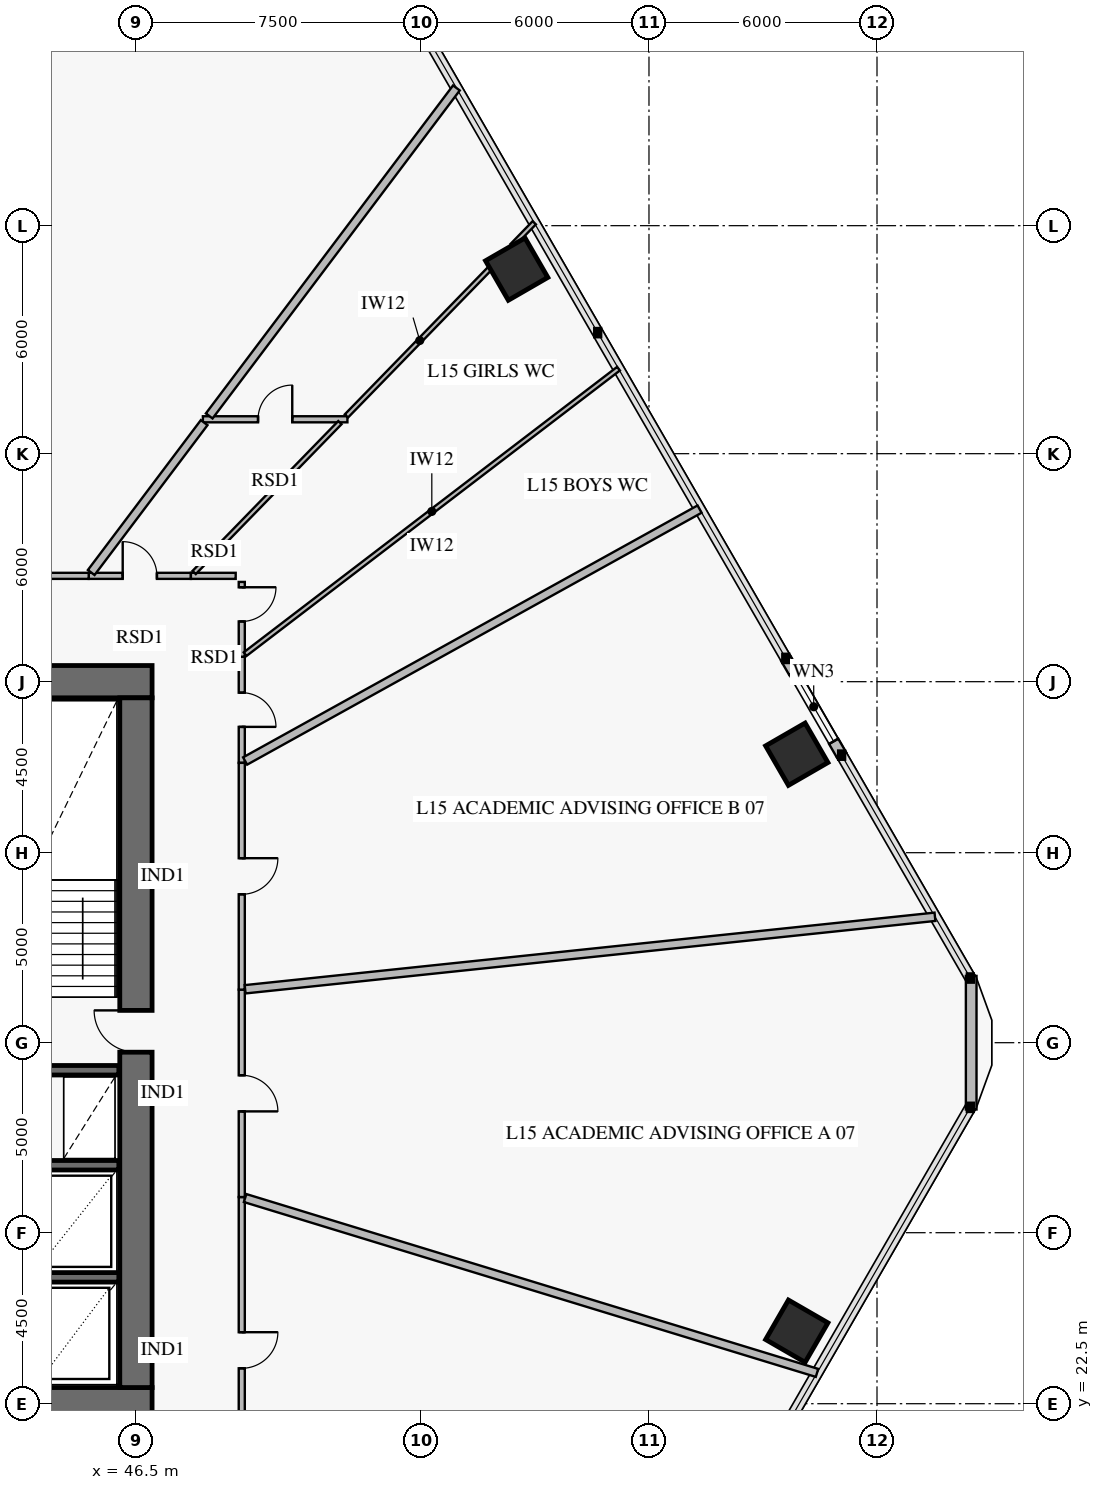
"""IFC4 building model, lengths in metres.
Left out: names, types, materials, properties, quantities, classifications, styles, units other than length and angle.
Written with IfcOpenShell. Run it as: python <this file> out.ifc"""

import sys

from ifc_helpers import new_model, si_unit, direction, frame, frame_2d, origin, origin_2d, place, context, subcontext, project, spatial, rectangle, extrude, element, fill, save


model = new_model("IFC4")
c1 = context("Model", 3, precision=1e-05, world=origin(), true_north=direction((0.0, 1.0)))
c2 = subcontext(c1, "Body", "Model", "MODEL_VIEW")
j1 = project(units=[si_unit("LENGTHUNIT", "METRE"), si_unit("PLANEANGLEUNIT", "RADIAN")], contexts=[c1])
p1 = place(None, origin())
s1 = spatial("IfcSite", under=j1, at=p1, CompositionType="ELEMENT")
p2 = place(p1, origin())
s2 = spatial("IfcBuilding", under=s1, at=p2, CompositionType="ELEMENT")
p3 = place(p2, frame((0.0, 0.0, 62.4)))
s3 = spatial("IfcBuildingStorey", under=s2, at=p3, CompositionType="ELEMENT", Elevation=62.4)
p4 = place(p3, frame((37.35, 22.5, 0.0), z_axis=(0.0, 0.0, 1.0), x_axis=(1.0, 0.0, 0.0)))
e1 = element("IfcWall", 1, at=p4, inside=s3, PredefinedType="SHEAR", context=c2, shape_type="SweptSolid", body=[
    extrude(rectangle(XDim=9.575, YDim=0.85, at=frame_2d((4.788, 0.0))), origin(), (0.0, 0.0, 1.0), 4.2),
])
p5 = place(p4, frame((3.95, 0.0, 0.0)))
e2 = element("IfcOpeningElement", 2, at=p5, cuts=e1, PredefinedType="OPENING", context=c2, shape_type="SweptSolid", body=[
    extrude(rectangle(XDim=1.5, YDim=2.15, at=frame_2d((0.75, 1.075))), frame((0.0, 0.437, 0.0), z_axis=(0.0, -1.0, 0.0), x_axis=(1.0, 0.0, 0.0)), (0.0, 0.0, 1.0), 0.874),
])
p6 = place(p3, frame((46.925, 41.5, 0.0), z_axis=(0.0, 0.0, 1.0), x_axis=(-1.0, 0.0, 0.0)))
e3 = element("IfcWall", 3, at=p6, inside=s3, PredefinedType="SHEAR", context=c2, shape_type="SweptSolid", body=[
    extrude(rectangle(XDim=7.975, YDim=0.85, at=frame_2d((3.988, 0.0))), origin(), (0.0, 0.0, 1.0), 4.2),
])
p7 = place(p3, frame((46.5, 22.925, 0.0), z_axis=(0.0, 0.0, 1.0), x_axis=(0.0, 1.0, 0.0)))
e4 = element("IfcWall", 4, at=p7, inside=s3, PredefinedType="SHEAR", context=c2, shape_type="SweptSolid", body=[
    extrude(rectangle(XDim=18.15, YDim=0.85, at=frame_2d((9.075, 0.0))), origin(), (0.0, 0.0, 1.0), 4.2),
])
p8 = place(p7, frame((8.825, 0.0, 0.0)))
e5 = element("IfcOpeningElement", 5, at=p8, cuts=e4, PredefinedType="OPENING", context=c2, shape_type="SweptSolid", body=[
    extrude(rectangle(XDim=1.1, YDim=2.15, at=frame_2d((0.55, 1.075))), frame((0.0, 0.437, 0.0), z_axis=(0.0, -1.0, 0.0), x_axis=(1.0, 0.0, 0.0)), (0.0, 0.0, 1.0), 0.874),
])
for number, where, z_axis, x_axis in (
    (6, (63.889, 39.592, 0.0), (0.0, 0.0, 1.0), (-0.5, 0.866, 0.0)),
    (7, (56.519, 52.357, 0.0), (0.0, 0.0, 1.0), (-0.5, 0.866, 0.0)),
    (8, (63.889, 24.408, 0.0), (0.0, 0.0, 1.0), (0.5, 0.866, 0.0)),
):
    element("IfcColumn", number, at=place(p3, frame(where, z_axis=z_axis, x_axis=x_axis)), inside=s3, PredefinedType="COLUMN", context=c2, shape_type="SweptSolid", body=[
        extrude(rectangle(XDim=1.2, YDim=1.2, at=origin_2d()), origin(), (0.0, 0.0, 1.0), 3.92),
    ])
p9 = place(p3, frame((63.6, 42.113, 0.0), z_axis=(0.0, 0.0, 1.0), x_axis=(0.499988418424, -0.866032090307, 0.0)))
e9 = element("IfcWall", 9, at=p9, inside=s3, PredefinedType="SOLIDWALL", context=c2, shape_type="SweptSolid", body=[
    extrude(rectangle(XDim=2.94, YDim=0.28, at=frame_2d((1.47, 0.0))), origin(), (0.0, 0.0, 1.0), 3.492),
])
p10 = place(p9, frame((0.42, 0.0, 0.7)))
e10 = element("IfcOpeningElement", 10, at=p10, cuts=e9, PredefinedType="OPENING", context=c2, shape_type="SweptSolid", body=[
    extrude(rectangle(XDim=2.1, YDim=1.5, at=frame_2d((1.05, 0.75))), frame((0.0, 0.152, 0.0), z_axis=(0.0, -1.0, 0.0), x_axis=(1.0, 0.0, 0.0)), (0.0, 0.0, 1.0), 0.304),
])
p11 = place(p3, frame((68.479, 33.758, 0.0), z_axis=(0.0, 0.0, 1.0), x_axis=(0.0, -1.0, 0.0)))
e11 = element("IfcWall", 11, at=p11, inside=s3, PredefinedType="SOLIDWALL", context=c2, shape_type="SweptSolid", body=[
    extrude(rectangle(XDim=3.515, YDim=0.28, at=frame_2d((1.758, 0.0))), origin(), (0.0, 0.0, 1.0), 3.92),
])
p12 = place(p3, frame((25.95, 31.275, 0.0), z_axis=(0.0, 0.0, 1.0), x_axis=(1.0, 0.0, 0.0)))
e12 = element("IfcWall", 12, at=p12, inside=s3, PredefinedType="SOLIDWALL", context=c2, shape_type="SweptSolid", body=[
    extrude(rectangle(XDim=20.1, YDim=0.25, at=frame_2d((10.05, 0.0))), origin(), (0.0, 0.0, 1.0), 4.2),
])
p13 = place(p12, frame((2.6, 0.0, 0.0)))
e13 = element("IfcOpeningElement", 13, at=p13, cuts=e12, PredefinedType="OPENING", context=c2, shape_type="SweptSolid", body=[
    extrude(rectangle(XDim=1.1, YDim=2.15, at=frame_2d((0.55, 1.075))), frame((0.0, 0.137, 0.0), z_axis=(0.0, -1.0, 0.0), x_axis=(1.0, 0.0, 0.0)), (0.0, 0.0, 1.0), 0.274),
])
p14 = place(p12, frame((10.6, 0.0, 0.0)))
e14 = element("IfcOpeningElement", 14, at=p14, cuts=e12, PredefinedType="OPENING", context=c2, shape_type="SweptSolid", body=[
    extrude(rectangle(XDim=1.1, YDim=2.15, at=frame_2d((0.55, 1.075))), frame((0.0, 0.137, 0.0), z_axis=(0.0, -1.0, 0.0), x_axis=(1.0, 0.0, 0.0)), (0.0, 0.0, 1.0), 0.274),
])
p15 = place(p12, frame((16.35, 0.0, 0.0)))
e15 = element("IfcOpeningElement", 15, at=p15, cuts=e12, PredefinedType="OPENING", context=c2, shape_type="SweptSolid", body=[
    extrude(rectangle(XDim=1.1, YDim=2.15, at=frame_2d((0.55, 1.075))), frame((0.0, 0.137, 0.0), z_axis=(0.0, -1.0, 0.0), x_axis=(1.0, 0.0, 0.0)), (0.0, 0.0, 1.0), 0.274),
])
for number, where, z_axis, x_axis in (
    (16, (43.8, 25.825, 0.0), (0.0, 0.0, 1.0), (1.0, 0.0, 0.0)),
    (17, (43.8, 28.775, 0.0), (0.0, 0.0, 1.0), (1.0, 0.0, 0.0)),
):
    element("IfcWall", number, at=place(p3, frame(where, z_axis=z_axis, x_axis=x_axis)), inside=s3, PredefinedType="SOLIDWALL", context=c2, shape_type="SweptSolid", body=[
        extrude(rectangle(XDim=2.25, YDim=0.25, at=frame_2d((1.125, 0.0))), origin(), (0.0, 0.0, 1.0), 4.2),
    ])
p16 = place(p3, frame((49.285, 39.364, 0.0), z_axis=(0.0, 0.0, 1.0), x_axis=(0.0, 1.0, 0.0)))
e18 = element("IfcWall", 18, at=p16, inside=s3, PredefinedType="PARTITIONING", context=c2, shape_type="SweptSolid", body=[
    extrude(rectangle(XDim=2.793, YDim=0.16, at=frame_2d((1.396, 0.0))), origin(), (0.0, 0.0, 1.0), 3.92),
])
p17 = place(p16, frame((0.947, 0.0, 0.0)))
e19 = element("IfcOpeningElement", 19, at=p17, cuts=e18, PredefinedType="OPENING", context=c2, shape_type="SweptSolid", body=[
    extrude(rectangle(XDim=0.9, YDim=2.1, at=frame_2d((0.45, 1.05))), frame((0.0, 0.092, 0.0), z_axis=(0.0, -1.0, 0.0), x_axis=(1.0, 0.0, 0.0)), (0.0, 0.0, 1.0), 0.184),
])
p18 = place(p3, frame((49.285, 42.157, 0.0), z_axis=(0.0, 0.0, 1.0), x_axis=(0.0, 1.0, 0.0)))
e20 = element("IfcWall", 20, at=p18, inside=s3, PredefinedType="PARTITIONING", context=c2, shape_type="SweptSolid", body=[
    extrude(rectangle(XDim=1.968, YDim=0.16, at=frame_2d((0.984, 0.0))), origin(), (0.0, 0.0, 1.0), 3.92),
])
p19 = place(p18, frame((0.928, 0.0, 0.0)))
e21 = element("IfcOpeningElement", 21, at=p19, cuts=e20, PredefinedType="OPENING", context=c2, shape_type="SweptSolid", body=[
    extrude(rectangle(XDim=0.9, YDim=2.1, at=frame_2d((0.45, 1.05))), frame((0.0, 0.092, 0.0), z_axis=(0.0, -1.0, 0.0), x_axis=(1.0, 0.0, 0.0)), (0.0, 0.0, 1.0), 0.184),
])
p20 = place(p3, frame((48.262, 48.405, 0.0), z_axis=(0.0, 0.0, 1.0), x_axis=(1.0, 0.0, 0.0)))
e22 = element("IfcWall", 22, at=p20, inside=s3, PredefinedType="PARTITIONING", context=c2, shape_type="SweptSolid", body=[
    extrude(rectangle(XDim=3.803, YDim=0.16, at=frame_2d((1.901, 0.0))), origin(), (0.0, 0.0, 1.0), 3.47),
])
p21 = place(p20, frame((1.451, 0.0, 0.0)))
e23 = element("IfcOpeningElement", 23, at=p21, cuts=e22, PredefinedType="OPENING", context=c2, shape_type="SweptSolid", body=[
    extrude(rectangle(XDim=0.9, YDim=2.1, at=frame_2d((0.45, 1.05))), frame((0.0, 0.092, 0.0), z_axis=(0.0, -1.0, 0.0), x_axis=(1.0, 0.0, 0.0)), (0.0, 0.0, 1.0), 0.184),
])
p22 = place(p3, frame((47.947, 44.285, 0.0), z_axis=(0.0, 0.0, 1.0), x_axis=(-1.0, 0.0, 0.0)))
e24 = element("IfcWall", 24, at=p22, inside=s3, PredefinedType="PARTITIONING", context=c2, shape_type="SweptSolid", body=[
    extrude(rectangle(XDim=2.689, YDim=0.16, at=frame_2d((1.345, 0.0))), origin(), (0.0, 0.0, 1.0), 3.92),
])
p23 = place(p22, frame((0.895, 0.0, 0.0)))
e25 = element("IfcOpeningElement", 25, at=p23, cuts=e24, PredefinedType="OPENING", context=c2, shape_type="SweptSolid", body=[
    extrude(rectangle(XDim=0.9, YDim=2.1, at=frame_2d((0.45, 1.05))), frame((0.0, 0.092, 0.0), z_axis=(0.0, -1.0, 0.0), x_axis=(1.0, 0.0, 0.0)), (0.0, 0.0, 1.0), 0.184),
])
p24 = place(p3, frame((45.257, 44.285, 0.0), z_axis=(0.0, 0.0, 1.0), x_axis=(-1.0, 0.0, 0.0)))
e26 = element("IfcWall", 26, at=p24, inside=s3, PredefinedType="PARTITIONING", context=c2, shape_type="SweptSolid", body=[
    extrude(rectangle(XDim=11.869, YDim=0.16, at=frame_2d((5.934, 0.0))), origin(), (0.0, 0.0, 1.0), 3.22),
])
p25 = place(p24, frame((5.184, 0.0, 0.0)))
e27 = element("IfcOpeningElement", 27, at=p25, cuts=e26, PredefinedType="OPENING", context=c2, shape_type="SweptSolid", body=[
    extrude(rectangle(XDim=1.5, YDim=2.15, at=frame_2d((0.75, 1.075))), frame((0.0, 0.092, 0.0), z_axis=(0.0, -1.0, 0.0), x_axis=(1.0, 0.0, 0.0)), (0.0, 0.0, 1.0), 0.184),
])
p26 = place(p3, frame((49.285, 19.875, 0.0), z_axis=(0.0, 0.0, 1.0), x_axis=(0.0, 1.0, 0.0)))
e28 = element("IfcWall", 28, at=p26, inside=s3, PredefinedType="PARTITIONING", context=c2, shape_type="SweptSolid", body=[
    extrude(rectangle(XDim=8.063, YDim=0.16, at=frame_2d((4.032, 0.0))), origin(), (0.0, 0.0, 1.0), 3.92),
])
p27 = place(p26, frame((3.557, 0.0, 0.0)))
e29 = element("IfcOpeningElement", 29, at=p27, cuts=e28, PredefinedType="OPENING", context=c2, shape_type="SweptSolid", body=[
    extrude(rectangle(XDim=0.95, YDim=2.1, at=frame_2d((0.475, 1.05))), frame((0.0, 0.092, 0.0), z_axis=(0.0, -1.0, 0.0), x_axis=(1.0, 0.0, 0.0)), (0.0, 0.0, 1.0), 0.184),
])
p28 = place(p3, frame((49.285, 27.938, 0.0), z_axis=(0.0, 0.0, 1.0), x_axis=(0.0, 1.0, 0.0)))
e30 = element("IfcWall", 30, at=p28, inside=s3, PredefinedType="PARTITIONING", context=c2, shape_type="SweptSolid", body=[
    extrude(rectangle(XDim=5.458, YDim=0.16, at=frame_2d((2.729, 0.0))), origin(), (0.0, 0.0, 1.0), 3.22),
])
p29 = place(p28, frame((2.254, 0.0, 0.0)))
e31 = element("IfcOpeningElement", 31, at=p29, cuts=e30, PredefinedType="OPENING", context=c2, shape_type="SweptSolid", body=[
    extrude(rectangle(XDim=0.95, YDim=2.1, at=frame_2d((0.475, 1.05))), frame((0.0, 0.092, 0.0), z_axis=(0.0, -1.0, 0.0), x_axis=(1.0, 0.0, 0.0)), (0.0, 0.0, 1.0), 0.184),
])
p30 = place(p3, frame((49.285, 33.396, 0.0), z_axis=(0.0, 0.0, 1.0), x_axis=(0.0, 1.0, 0.0)))
e32 = element("IfcWall", 32, at=p30, inside=s3, PredefinedType="PARTITIONING", context=c2, shape_type="SweptSolid", body=[
    extrude(rectangle(XDim=5.968, YDim=0.16, at=frame_2d((2.984, 0.0))), origin(), (0.0, 0.0, 1.0), 3.22),
])
p31 = place(p30, frame((2.509, 0.0, 0.0)))
e33 = element("IfcOpeningElement", 33, at=p31, cuts=e32, PredefinedType="OPENING", context=c2, shape_type="SweptSolid", body=[
    extrude(rectangle(XDim=0.95, YDim=2.1, at=frame_2d((0.475, 1.05))), frame((0.0, 0.092, 0.0), z_axis=(0.0, -1.0, 0.0), x_axis=(1.0, 0.0, 0.0)), (0.0, 0.0, 1.0), 0.184),
])
p32 = place(p3, frame((49.373, 39.413, 0.0), z_axis=(0.0, 0.0, 1.0), x_axis=(0.874620963666, 0.484807353405, 0.0)))
e34 = element("IfcWall", 34, at=p32, inside=s3, PredefinedType="PARTITIONING", context=c2, shape_type="SweptSolid", body=[
    extrude(rectangle(XDim=13.673, YDim=0.22, at=frame_2d((6.836, 0.0))), origin(), (0.0, 0.0, 1.0), 3.17),
])
p33 = place(p3, frame((49.373, 42.225, 0.0), z_axis=(0.0, 0.0, 1.0), x_axis=(0.794422824401, 0.607365109362, 0.0)))
e35 = element("IfcWall", 35, at=p33, inside=s3, PredefinedType="PARTITIONING", context=c2, shape_type="SweptSolid", body=[
    extrude(rectangle(XDim=12.368, YDim=0.12, at=frame_2d((6.184, 0.0))), origin(), (0.0, 0.0, 1.0), 3.17),
])
p34 = place(p3, frame((49.125, 44.285, 0.0), z_axis=(0.0, 0.0, 1.0), x_axis=(-1.0, 0.0, 0.0)))
e36 = element("IfcWall", 36, at=p34, inside=s3, PredefinedType="PARTITIONING", context=c2, shape_type="SweptSolid", body=[
    extrude(rectangle(XDim=1.178, YDim=0.16, at=frame_2d((0.589, 0.0))), origin(), (0.0, 0.0, 1.0), 3.22),
])
p35 = place(p3, frame((48.032, 44.373, 0.0), z_axis=(0.0, 0.0, 1.0), x_axis=(0.697186119011, 0.716890169732, 0.0)))
e37 = element("IfcWall", 37, at=p35, inside=s3, PredefinedType="PARTITIONING", context=c2, shape_type="SweptSolid", body=[
    extrude(rectangle(XDim=5.501, YDim=0.12, at=frame_2d((2.75, 0.0))), origin(), (0.0, 0.0, 1.0), 3.47),
])
p36 = place(p3, frame((52.039, 48.493, 0.0), z_axis=(0.0, 0.0, 1.0), x_axis=(0.697138835877, 0.716936150234, 0.0)))
e38 = element("IfcWall", 38, at=p36, inside=s3, PredefinedType="PARTITIONING", context=c2, shape_type="SweptSolid", body=[
    extrude(rectangle(XDim=5.537, YDim=0.12, at=frame_2d((2.769, 0.0))), origin(), (0.0, 0.0, 1.0), 3.92),
])
p37 = place(p3, frame((56.399, 52.977, 0.0), z_axis=(0.0, 0.0, 1.0), x_axis=(0.69724946606, 0.716828558359, 0.0)))
e39 = element("IfcWall", 39, at=p37, inside=s3, PredefinedType="PARTITIONING", context=c2, shape_type="SweptSolid", body=[
    extrude(rectangle(XDim=0.835, YDim=0.12, at=frame_2d((0.418, 0.0))), origin(), (0.0, 0.0, 1.0), 3.92),
])
p38 = place(p3, frame((45.324, 44.373, 0.0), z_axis=(0.0, 0.0, 1.0), x_axis=(0.601817794095, 0.798633421984, 0.0)))
e40 = element("IfcWall", 40, at=p38, inside=s3, PredefinedType="PARTITIONING", context=c2, shape_type="SweptSolid", body=[
    extrude(rectangle(XDim=4.938, YDim=0.22, at=frame_2d((2.469, 0.0))), origin(), (0.0, 0.0, 1.0), 3.92),
])
p39 = place(p3, frame((48.428, 48.493, 0.0), z_axis=(0.0, 0.0, 1.0), x_axis=(0.601802006389, 0.798645318715, 0.0)))
e41 = element("IfcWall", 41, at=p39, inside=s3, PredefinedType="PARTITIONING", context=c2, shape_type="SweptSolid", body=[
    extrude(rectangle(XDim=10.808, YDim=0.22, at=frame_2d((5.404, 0.0))), origin(), (0.0, 0.0, 1.0), 3.17),
])
p40 = place(p3, frame((49.373, 27.912, 0.0), z_axis=(0.0, 0.0, 1.0), x_axis=(0.956304467386, -0.292372648614, 0.0)))
e42 = element("IfcWall", 42, at=p40, inside=s3, PredefinedType="PARTITIONING", context=c2, shape_type="SweptSolid", body=[
    extrude(rectangle(XDim=15.736, YDim=0.22, at=frame_2d((7.868, 0.0))), origin(), (0.0, 0.0, 1.0), 3.17),
])
p41 = place(p3, frame((49.373, 33.406, 0.0), z_axis=(0.0, 0.0, 1.0), x_axis=(0.994521492256, 0.104532298553, 0.0)))
e43 = element("IfcWall", 43, at=p41, inside=s3, PredefinedType="PARTITIONING", context=c2, shape_type="SweptSolid", body=[
    extrude(rectangle(XDim=18.252, YDim=0.22, at=frame_2d((9.126, 0.0))), origin(), (0.0, 0.0, 1.0), 3.17),
])
p42 = place(p10, origin())
e44 = element("IfcWindow", 44, at=p42, inside=s3, PartitioningType="SINGLE_PANEL", PredefinedType="WINDOW", context=c2, shape_type="SweptSolid", body=[
    extrude(rectangle(XDim=2.1, YDim=1.5, at=frame_2d((1.05, 0.75))), frame((0.0, 0.03, 0.0), z_axis=(0.0, -1.0, 0.0), x_axis=(1.0, 0.0, 0.0)), (0.0, 0.0, 1.0), 0.06),
])
fill(e10, e44)
p43 = place(p8, origin())
e45 = element("IfcDoor", 45, at=p43, inside=s3, OperationType="SINGLE_SWING_RIGHT", PredefinedType="USERDEFINED", context=c2, shape_type="SweptSolid", body=[
    extrude(rectangle(XDim=1.1, YDim=2.15, at=frame_2d((0.55, 1.075))), frame((0.0, 0.025, 0.0), z_axis=(0.0, -1.0, 0.0), x_axis=(1.0, 0.0, 0.0)), (0.0, 0.0, 1.0), 0.05),
])
fill(e5, e45)
p44 = place(p17, frame((0.9, 0.0, 0.0), z_axis=(0.0, 0.0, 1.0), x_axis=(-1.0, 0.0, 0.0)))
e46 = element("IfcDoor", 46, at=p44, inside=s3, OperationType="SINGLE_SWING_RIGHT", PredefinedType="DOOR", context=c2, shape_type="SweptSolid", body=[
    extrude(rectangle(XDim=0.9, YDim=2.1, at=frame_2d((0.45, 1.05))), frame((0.0, 0.025, 0.0), z_axis=(0.0, -1.0, 0.0), x_axis=(1.0, 0.0, 0.0)), (0.0, 0.0, 1.0), 0.05),
])
fill(e19, e46)
p45 = place(p19, frame((0.9, 0.0, 0.0), z_axis=(0.0, 0.0, 1.0), x_axis=(-1.0, 0.0, 0.0)))
e47 = element("IfcDoor", 47, at=p45, inside=s3, OperationType="SINGLE_SWING_LEFT", PredefinedType="DOOR", context=c2, shape_type="SweptSolid", body=[
    extrude(rectangle(XDim=0.9, YDim=2.1, at=frame_2d((0.45, 1.05))), frame((0.0, 0.025, 0.0), z_axis=(0.0, -1.0, 0.0), x_axis=(1.0, 0.0, 0.0)), (0.0, 0.0, 1.0), 0.05),
])
fill(e21, e47)
p46 = place(p21, origin())
e48 = element("IfcDoor", 48, at=p46, inside=s3, OperationType="SINGLE_SWING_RIGHT", PredefinedType="DOOR", context=c2, shape_type="SweptSolid", body=[
    extrude(rectangle(XDim=0.9, YDim=2.1, at=frame_2d((0.45, 1.05))), frame((0.0, 0.025, 0.0), z_axis=(0.0, -1.0, 0.0), x_axis=(1.0, 0.0, 0.0)), (0.0, 0.0, 1.0), 0.05),
])
fill(e23, e48)
p47 = place(p23, frame((0.9, 0.0, 0.0), z_axis=(0.0, 0.0, 1.0), x_axis=(-1.0, 0.0, 0.0)))
e49 = element("IfcDoor", 49, at=p47, inside=s3, OperationType="SINGLE_SWING_LEFT", PredefinedType="DOOR", context=c2, shape_type="SweptSolid", body=[
    extrude(rectangle(XDim=0.9, YDim=2.1, at=frame_2d((0.45, 1.05))), frame((0.0, 0.025, 0.0), z_axis=(0.0, -1.0, 0.0), x_axis=(1.0, 0.0, 0.0)), (0.0, 0.0, 1.0), 0.05),
])
fill(e25, e49)
p48 = place(p27, frame((0.95, 0.0, 0.0), z_axis=(0.0, 0.0, 1.0), x_axis=(-1.0, 0.0, 0.0)))
e50 = element("IfcDoor", 50, at=p48, inside=s3, OperationType="SINGLE_SWING_LEFT", PredefinedType="DOOR", context=c2, shape_type="SweptSolid", body=[
    extrude(rectangle(XDim=0.95, YDim=2.1, at=frame_2d((0.475, 1.05))), frame((0.0, 0.025, 0.0), z_axis=(0.0, -1.0, 0.0), x_axis=(1.0, 0.0, 0.0)), (0.0, 0.0, 1.0), 0.05),
])
fill(e29, e50)
p49 = place(p29, frame((0.95, 0.0, 0.0), z_axis=(0.0, 0.0, 1.0), x_axis=(-1.0, 0.0, 0.0)))
e51 = element("IfcDoor", 51, at=p49, inside=s3, OperationType="SINGLE_SWING_RIGHT", PredefinedType="DOOR", context=c2, shape_type="SweptSolid", body=[
    extrude(rectangle(XDim=0.95, YDim=2.1, at=frame_2d((0.475, 1.05))), frame((0.0, 0.025, 0.0), z_axis=(0.0, -1.0, 0.0), x_axis=(1.0, 0.0, 0.0)), (0.0, 0.0, 1.0), 0.05),
])
fill(e31, e51)
p50 = place(p31, frame((0.95, 0.0, 0.0), z_axis=(0.0, 0.0, 1.0), x_axis=(-1.0, 0.0, 0.0)))
e52 = element("IfcDoor", 52, at=p50, inside=s3, OperationType="SINGLE_SWING_LEFT", PredefinedType="DOOR", context=c2, shape_type="SweptSolid", body=[
    extrude(rectangle(XDim=0.95, YDim=2.1, at=frame_2d((0.475, 1.05))), frame((0.0, 0.025, 0.0), z_axis=(0.0, -1.0, 0.0), x_axis=(1.0, 0.0, 0.0)), (0.0, 0.0, 1.0), 0.05),
])
fill(e33, e52)
save(model, sys.argv[1])
